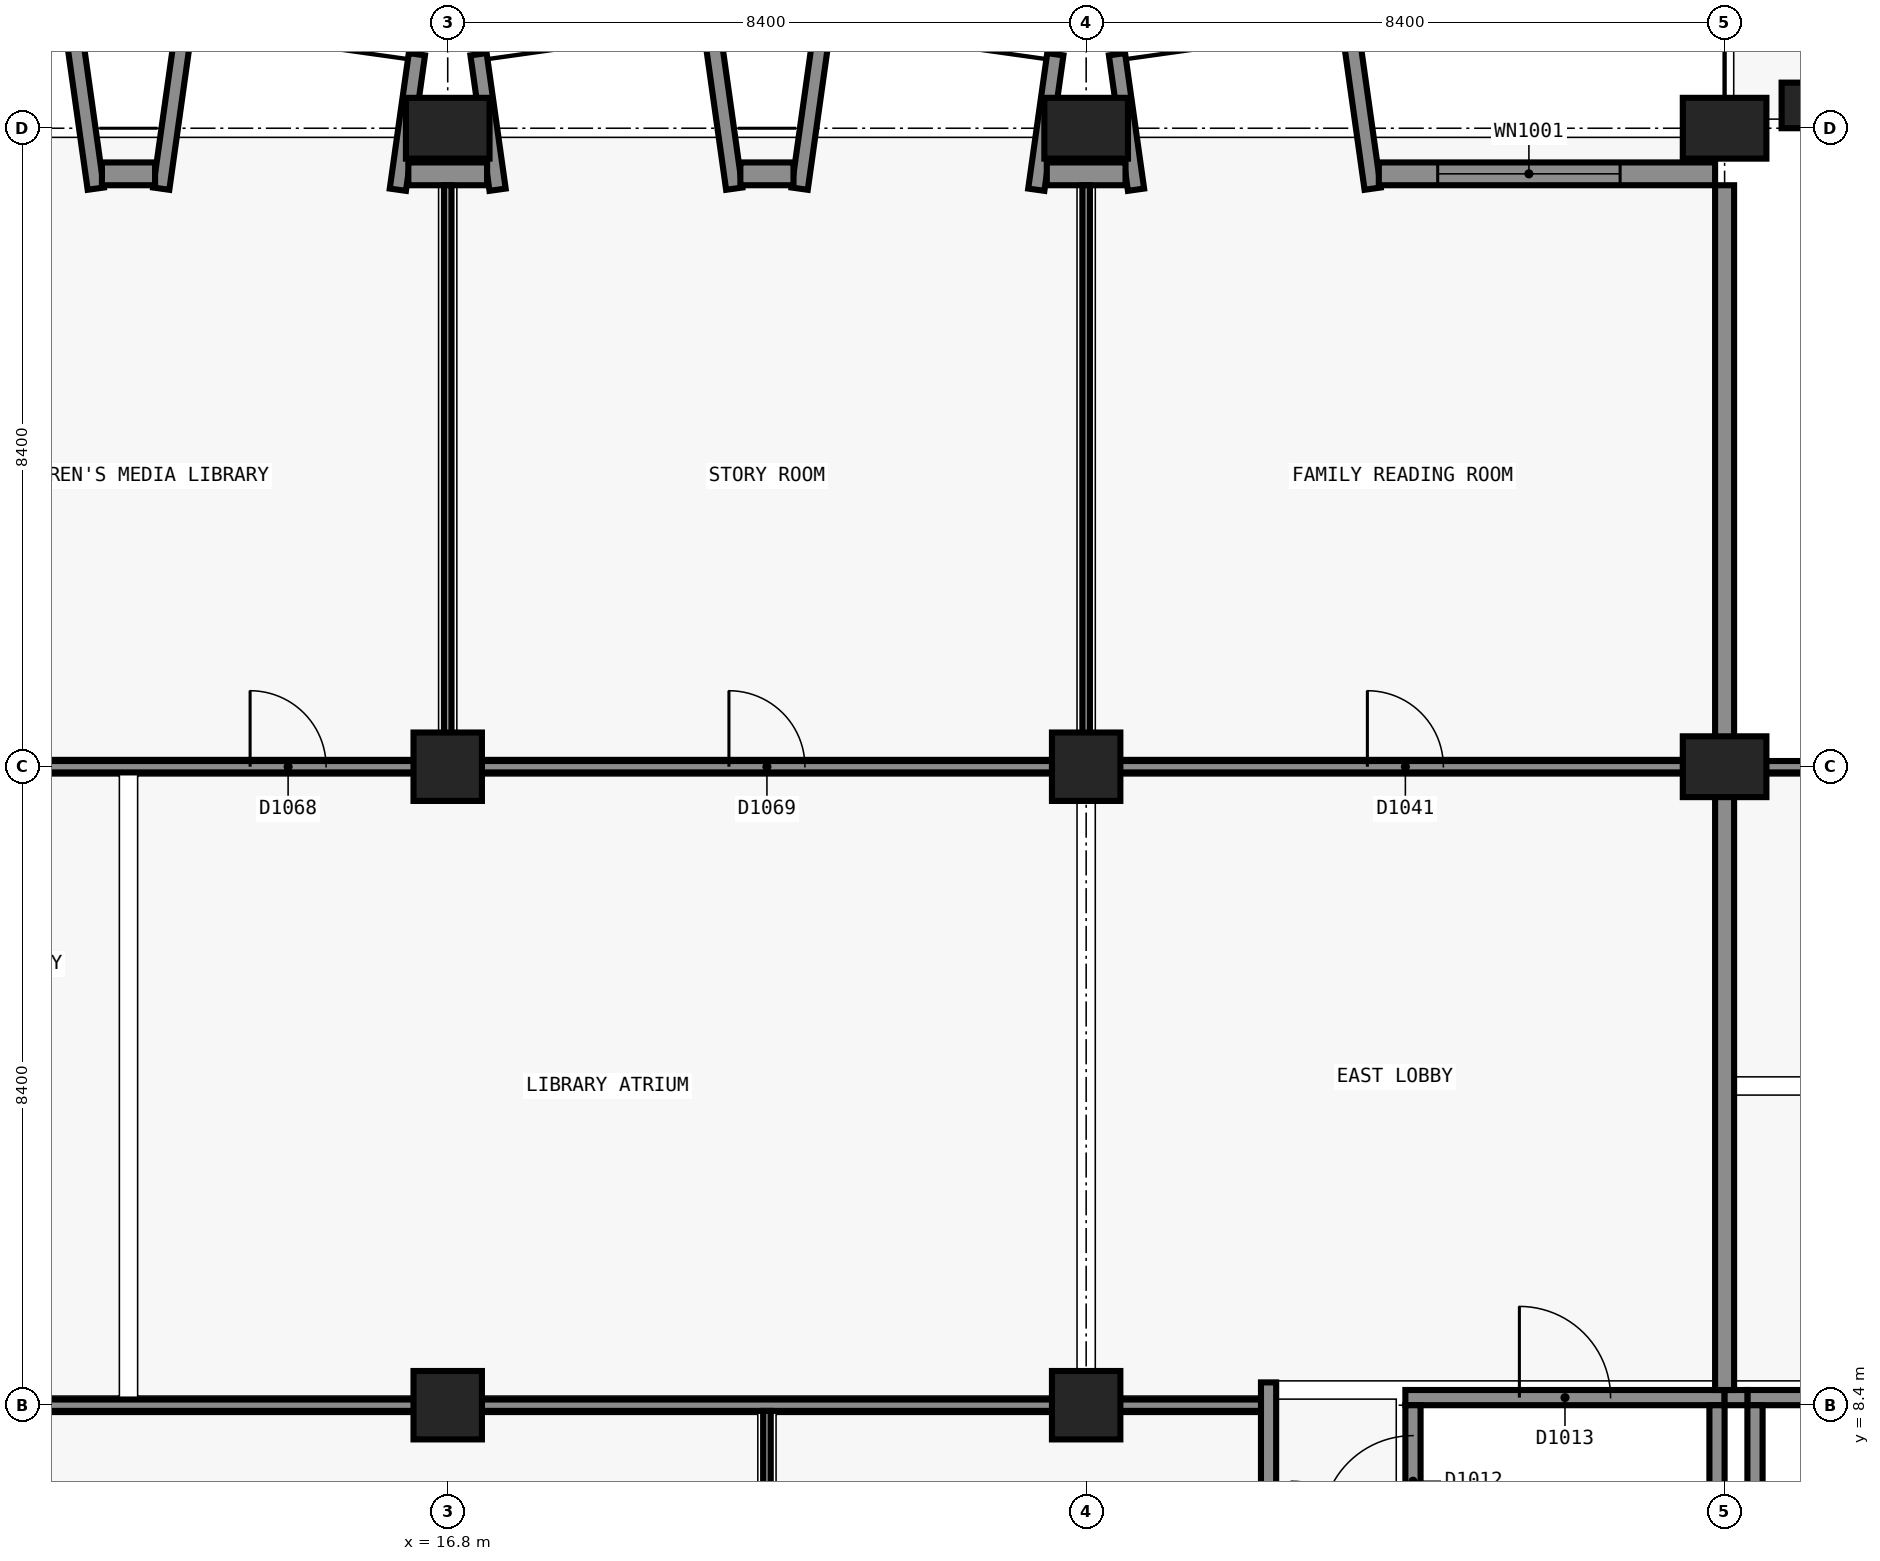
"""IFC4 building model, lengths in metres.
Left out: names, types, materials, properties, quantities, classifications, styles, units other than length and angle.
Written with IfcOpenShell. Run it as: python <this file> out.ifc"""

import sys

from ifc_helpers import new_model, si_unit, direction, frame, frame_2d, origin, origin_2d, place, context, subcontext, project, spatial, rectangle, extrude, element, fill, save


model = new_model("IFC4")
c1 = context("Model", 3, precision=1e-05, world=origin(), true_north=direction((0.0, 1.0)))
c2 = subcontext(c1, "Body", "Model", "MODEL_VIEW")
j1 = project(units=[si_unit("LENGTHUNIT", "METRE"), si_unit("PLANEANGLEUNIT", "RADIAN")], contexts=[c1])
p1 = place(None, origin())
s1 = spatial("IfcSite", under=j1, at=p1, CompositionType="ELEMENT")
p2 = place(p1, origin())
s2 = spatial("IfcBuilding", under=s1, at=p2, CompositionType="ELEMENT")
p3 = place(p2, frame((0.0, 0.0, 5.4)))
s3 = spatial("IfcBuildingStorey", under=s2, at=p3, CompositionType="ELEMENT", Elevation=5.4)
p4 = place(p3, frame((29.4, 8.5, 0.0), z_axis=(0.0, 0.0, 1.0), x_axis=(1.0, 0.0, 0.0)))
e1 = element("IfcWall", 1, at=p4, inside=s3, PredefinedType="SHEAR", context=c2, shape_type="SweptSolid", body=[
    extrude(rectangle(XDim=4.2, YDim=0.2, at=frame_2d((2.1, 0.0))), origin(), (0.0, 0.0, 1.0), 4.8),
])
p5 = place(p4, frame((1.5, 0.0, 0.0)))
e2 = element("IfcOpeningElement", 2, at=p5, cuts=e1, PredefinedType="OPENING", context=c2, shape_type="SweptSolid", body=[
    extrude(rectangle(XDim=1.2, YDim=2.1, at=frame_2d((0.6, 1.05))), frame((0.0, 0.11, 0.0), z_axis=(0.0, -1.0, 0.0), x_axis=(1.0, 0.0, 0.0)), (0.0, 0.0, 1.0), 0.22),
])
p6 = place(p3, frame((29.5, 0.2, 0.0), z_axis=(0.0, 0.0, 1.0), x_axis=(0.0, 1.0, 0.0)))
e3 = element("IfcWall", 3, at=p6, inside=s3, PredefinedType="SHEAR", context=c2, shape_type="SweptSolid", body=[
    extrude(rectangle(XDim=8.2, YDim=0.2, at=frame_2d((4.1, 0.0))), origin(), (0.0, 0.0, 1.0), 4.8),
])
p7 = place(p6, frame((6.6, 0.0, 0.0)))
e4 = element("IfcOpeningElement", 4, at=p7, cuts=e3, PredefinedType="OPENING", context=c2, shape_type="SweptSolid", body=[
    extrude(rectangle(XDim=1.2, YDim=2.1, at=frame_2d((0.6, 1.05))), frame((0.0, 0.11, 0.0), z_axis=(0.0, -1.0, 0.0), x_axis=(1.0, 0.0, 0.0)), (0.0, 0.0, 1.0), 0.22),
])
p8 = place(p3, frame((33.5, 8.4, 0.0), z_axis=(0.0, 0.0, 1.0), x_axis=(0.0, -1.0, 0.0)))
e5 = element("IfcWall", 5, at=p8, inside=s3, PredefinedType="SHEAR", context=c2, shape_type="SweptSolid", body=[
    extrude(rectangle(XDim=8.2, YDim=0.2, at=frame_2d((4.1, 0.0))), origin(), (0.0, 0.0, 1.0), 4.8),
])
p9 = place(p3, frame((33.9, 8.5, 0.0), z_axis=(0.0, 0.0, 1.0), x_axis=(1.0, 0.0, 0.0)))
e6 = element("IfcWall", 6, at=p9, inside=s3, PredefinedType="SHEAR", context=c2, shape_type="SweptSolid", body=[
    extrude(rectangle(XDim=3.9, YDim=0.2, at=frame_2d((1.95, 0.0))), origin(), (0.0, 0.0, 1.0), 4.8),
])
p10 = place(p9, frame((1.2, 0.0, 0.0)))
e7 = element("IfcOpeningElement", 7, at=p10, cuts=e6, PredefinedType="OPENING", context=c2, shape_type="SweptSolid", body=[
    extrude(rectangle(XDim=1.2, YDim=2.1, at=frame_2d((0.6, 1.05))), frame((0.0, 0.11, 0.0), z_axis=(0.0, -1.0, 0.0), x_axis=(1.0, 0.0, 0.0)), (0.0, 0.0, 1.0), 0.22),
])
p11 = place(p3, frame((34.0, 0.2, 0.0), z_axis=(0.0, 0.0, 1.0), x_axis=(0.0, 1.0, 0.0)))
e8 = element("IfcWall", 8, at=p11, inside=s3, PredefinedType="SHEAR", context=c2, shape_type="SweptSolid", body=[
    extrude(rectangle(XDim=8.2, YDim=0.2, at=frame_2d((4.1, 0.0))), origin(), (0.0, 0.0, 1.0), 4.8),
])
for number, where, z_axis, x_axis in (
    (9, (16.8, 8.4, 0.0), (0.0, 0.0, 1.0), (1.0, 0.0, 0.0)),
    (10, (16.8, 16.8, 0.0), (0.0, 0.0, 1.0), (1.0, 0.0, 0.0)),
):
    element("IfcColumn", number, at=place(p3, frame(where, z_axis=z_axis, x_axis=x_axis)), inside=s3, PredefinedType="COLUMN", context=c2, shape_type="SweptSolid", body=[
        extrude(rectangle(XDim=0.9, YDim=0.9, at=origin_2d()), origin(), (0.0, 0.0, 1.0), 4.8),
    ])
p12 = place(p3, frame((16.8, 25.2, 0.0), z_axis=(0.0, 0.0, 1.0), x_axis=(1.0, 0.0, 0.0)))
e11 = element("IfcColumn", 11, at=p12, inside=s3, PredefinedType="COLUMN", context=c2, shape_type="SweptSolid", body=[
    extrude(rectangle(XDim=1.1, YDim=0.8, at=origin_2d()), origin(), (0.0, 0.0, 1.0), 4.8),
])
for number, where, z_axis, x_axis in (
    (12, (25.2, 8.4, 0.0), (0.0, 0.0, 1.0), (1.0, 0.0, 0.0)),
    (13, (25.2, 16.8, 0.0), (0.0, 0.0, 1.0), (1.0, 0.0, 0.0)),
):
    element("IfcColumn", number, at=place(p3, frame(where, z_axis=z_axis, x_axis=x_axis)), inside=s3, PredefinedType="COLUMN", context=c2, shape_type="SweptSolid", body=[
        extrude(rectangle(XDim=0.9, YDim=0.9, at=origin_2d()), origin(), (0.0, 0.0, 1.0), 4.8),
    ])
for number, where, z_axis, x_axis in (
    (14, (25.2, 25.2, 0.0), (0.0, 0.0, 1.0), (1.0, 0.0, 0.0)),
    (15, (33.6, 16.8, 0.0), (0.0, 0.0, 1.0), (0.0, 1.0, 0.0)),
    (16, (33.6, 25.2, 0.0), (0.0, 0.0, 1.0), (1.0, 0.0, 0.0)),
):
    element("IfcColumn", number, at=place(p3, frame(where, z_axis=z_axis, x_axis=x_axis)), inside=s3, PredefinedType="COLUMN", context=c2, shape_type="SweptSolid", body=[
        extrude(rectangle(XDim=1.1, YDim=0.8, at=origin_2d()), origin(), (0.0, 0.0, 1.0), 4.8),
    ])
p13 = place(p3, frame((34.65, 25.5, 0.0), z_axis=(0.0, 0.0, 1.0), x_axis=(1.0, 0.0, 0.0)))
e17 = element("IfcColumn", 17, at=p13, inside=s3, PredefinedType="COLUMN", context=c2, shape_type="SweptSolid", body=[
    extrude(rectangle(XDim=0.6, YDim=0.6, at=origin_2d()), origin(), (0.0, 0.0, 1.0), 4.8),
])
p14 = place(p3, frame((33.6, 8.5, 0.0), z_axis=(0.0, 0.0, 1.0), x_axis=(1.0, 0.0, 0.0)))
e18 = element("IfcWall", 18, at=p14, inside=s3, PredefinedType="SHEAR", context=c2, shape_type="SweptSolid", body=[
    extrude(rectangle(XDim=0.3, YDim=0.2, at=frame_2d((0.15, 0.0))), origin(), (0.0, 0.0, 1.0), 4.8),
])
p15 = place(p3, frame((12.169, 24.405, 0.0), z_axis=(0.0, 0.0, 1.0), x_axis=(-0.139141913905, 0.990272451295, 0.0)))
e19 = element("IfcWall", 19, at=p15, inside=s3, PredefinedType="SOLIDWALL", context=c2, shape_type="SweptSolid", body=[
    extrude(rectangle(XDim=2.219, YDim=0.215, at=frame_2d((1.11, 0.0))), origin(), (0.0, 0.0, 1.0), 4.5),
])
p16 = place(p3, frame((13.031, 24.405, 0.0), z_axis=(0.0, 0.0, 1.0), x_axis=(0.139249775508, 0.99025728981, 0.0)))
e20 = element("IfcWall", 20, at=p16, inside=s3, PredefinedType="SOLIDWALL", context=c2, shape_type="SweptSolid", body=[
    extrude(rectangle(XDim=2.22, YDim=0.215, at=frame_2d((1.11, 0.0))), origin(), (0.0, 0.0, 1.0), 4.5),
])
for number, where, z_axis, x_axis in (
    (21, (16.144, 24.391, 0.0), (0.0, 0.0, 1.0), (0.139, 0.99, 0.0)),
    (22, (17.456, 24.391, 0.0), (0.0, 0.0, 1.0), (-0.139, 0.99, 0.0)),
):
    element("IfcWall", number, at=place(p3, frame(where, z_axis=z_axis, x_axis=x_axis)), inside=s3, PredefinedType="SOLIDWALL", context=c2, shape_type="SweptSolid", body=[
        extrude(rectangle(XDim=1.8, YDim=0.215, at=frame_2d((0.9, 0.0))), origin(), (0.0, 0.0, 1.0), 4.5),
    ])
for number, where, z_axis, x_axis in (
    (23, (20.569, 24.405, 0.0), (0.0, 0.0, 1.0), (-0.139, 0.99, 0.0)),
    (24, (21.431, 24.405, 0.0), (0.0, 0.0, 1.0), (0.139, 0.99, 0.0)),
):
    element("IfcWall", number, at=place(p3, frame(where, z_axis=z_axis, x_axis=x_axis)), inside=s3, PredefinedType="SOLIDWALL", context=c2, shape_type="SweptSolid", body=[
        extrude(rectangle(XDim=2.219, YDim=0.215, at=frame_2d((1.11, 0.0))), origin(), (0.0, 0.0, 1.0), 4.5),
    ])
for number, where, z_axis, x_axis in (
    (25, (24.544, 24.391, 0.0), (0.0, 0.0, 1.0), (0.139, 0.99, 0.0)),
    (26, (25.856, 24.391, 0.0), (0.0, 0.0, 1.0), (-0.139, 0.99, 0.0)),
):
    element("IfcWall", number, at=place(p3, frame(where, z_axis=z_axis, x_axis=x_axis)), inside=s3, PredefinedType="SOLIDWALL", context=c2, shape_type="SweptSolid", body=[
        extrude(rectangle(XDim=1.8, YDim=0.215, at=frame_2d((0.9, 0.0))), origin(), (0.0, 0.0, 1.0), 4.5),
    ])
p17 = place(p3, frame((28.969, 24.405, 0.0), z_axis=(0.0, 0.0, 1.0), x_axis=(-0.139249775508, 0.99025728981, 0.0)))
e27 = element("IfcWall", 27, at=p17, inside=s3, PredefinedType="SOLIDWALL", context=c2, shape_type="SweptSolid", body=[
    extrude(rectangle(XDim=2.22, YDim=0.215, at=frame_2d((1.11, 0.0))), origin(), (0.0, 0.0, 1.0), 4.5),
])
p18 = place(p3, frame((12.25, 24.6, 0.0), z_axis=(0.0, 0.0, 1.0), x_axis=(1.0, 0.0, 0.0)))
e28 = element("IfcWall", 28, at=p18, inside=s3, PredefinedType="SOLIDWALL", context=c2, shape_type="SweptSolid", body=[
    extrude(rectangle(XDim=0.699, YDim=0.3, at=frame_2d((0.35, 0.0))), origin(), (0.0, 0.0, 1.0), 4.5),
])
p19 = place(p3, frame((16.282, 24.6, 0.0), z_axis=(0.0, 0.0, 1.0), x_axis=(1.0, 0.0, 0.0)))
e29 = element("IfcWall", 29, at=p19, inside=s3, PredefinedType="SOLIDWALL", context=c2, shape_type="SweptSolid", body=[
    extrude(rectangle(XDim=1.036, YDim=0.3, at=frame_2d((0.518, 0.0))), origin(), (0.0, 0.0, 1.0), 4.5),
])
p20 = place(p3, frame((20.65, 24.6, 0.0), z_axis=(0.0, 0.0, 1.0), x_axis=(1.0, 0.0, 0.0)))
e30 = element("IfcWall", 30, at=p20, inside=s3, PredefinedType="SOLIDWALL", context=c2, shape_type="SweptSolid", body=[
    extrude(rectangle(XDim=0.699, YDim=0.3, at=frame_2d((0.35, 0.0))), origin(), (0.0, 0.0, 1.0), 4.5),
])
p21 = place(p3, frame((24.682, 24.6, 0.0), z_axis=(0.0, 0.0, 1.0), x_axis=(1.0, 0.0, 0.0)))
e31 = element("IfcWall", 31, at=p21, inside=s3, PredefinedType="SOLIDWALL", context=c2, shape_type="SweptSolid", body=[
    extrude(rectangle(XDim=1.036, YDim=0.3, at=frame_2d((0.518, 0.0))), origin(), (0.0, 0.0, 1.0), 4.5),
])
p22 = place(p3, frame((29.051, 24.6, 0.0), z_axis=(0.0, 0.0, 1.0), x_axis=(1.0, 0.0, 0.0)))
e32 = element("IfcWall", 32, at=p22, inside=s3, PredefinedType="SOLIDWALL", context=c2, shape_type="SweptSolid", body=[
    extrude(rectangle(XDim=4.425, YDim=0.3, at=frame_2d((2.212, 0.0))), origin(), (0.0, 0.0, 1.0), 4.5),
])
p23 = place(p22, frame((0.775, 0.0, 0.9)))
e33 = element("IfcOpeningElement", 33, at=p23, cuts=e32, PredefinedType="OPENING", context=c2, shape_type="SweptSolid", body=[
    extrude(rectangle(XDim=2.4, YDim=1.5, at=frame_2d((1.2, 0.75))), frame((0.0, 0.16, 0.0), z_axis=(0.0, -1.0, 0.0), x_axis=(1.0, 0.0, 0.0)), (0.0, 0.0, 1.0), 0.32),
])
p24 = place(p3, frame((33.6, 8.6, 0.0), z_axis=(0.0, 0.0, 1.0), x_axis=(0.0, 1.0, 0.0)))
e34 = element("IfcWall", 34, at=p24, inside=s3, PredefinedType="SOLIDWALL", context=c2, shape_type="SweptSolid", body=[
    extrude(rectangle(XDim=15.85, YDim=0.25, at=frame_2d((7.925, 0.0))), origin(), (0.0, 0.0, 1.0), 3.8),
])
p25 = place(p3, frame((27.6, 6.3, 0.0), z_axis=(0.0, 0.0, 1.0), x_axis=(0.0, 1.0, 0.0)))
e35 = element("IfcWall", 35, at=p25, inside=s3, PredefinedType="SOLIDWALL", context=c2, shape_type="SweptSolid", body=[
    extrude(rectangle(XDim=2.4, YDim=0.2, at=frame_2d((1.2, 0.0))), origin(), (0.0, 0.0, 1.0), 4.0),
])
p26 = place(p3, frame((8.325, 8.4, 0.0), z_axis=(0.0, 0.0, 1.0), x_axis=(1.0, 0.0, 0.0)))
e36 = element("IfcWall", 36, at=p26, inside=s3, PredefinedType="PARTITIONING", context=c2, shape_type="SweptSolid", body=[
    extrude(rectangle(XDim=19.175, YDim=0.15, at=frame_2d((9.587, 0.0))), origin(), (0.0, 0.0, 1.0), 3.8),
])
p27 = place(p3, frame((8.325, 16.8, 0.0), z_axis=(0.0, 0.0, 1.0), x_axis=(1.0, 0.0, 0.0)))
e37 = element("IfcWall", 37, at=p27, inside=s3, PredefinedType="PARTITIONING", context=c2, shape_type="SweptSolid", body=[
    extrude(rectangle(XDim=25.15, YDim=0.15, at=frame_2d((12.575, 0.0))), origin(), (0.0, 0.0, 1.0), 3.8),
])
p28 = place(p27, frame((20.575, 0.0, 0.0)))
e38 = element("IfcOpeningElement", 38, at=p28, cuts=e37, PredefinedType="OPENING", context=c2, shape_type="SweptSolid", body=[
    extrude(rectangle(XDim=1.0, YDim=2.1, at=frame_2d((0.5, 1.05))), frame((0.0, 0.085, 0.0), z_axis=(0.0, -1.0, 0.0), x_axis=(1.0, 0.0, 0.0)), (0.0, 0.0, 1.0), 0.17),
])
p29 = place(p27, frame((5.875, 0.0, 0.0)))
e39 = element("IfcOpeningElement", 39, at=p29, cuts=e37, PredefinedType="OPENING", context=c2, shape_type="SweptSolid", body=[
    extrude(rectangle(XDim=1.0, YDim=2.1, at=frame_2d((0.5, 1.05))), frame((0.0, 0.085, 0.0), z_axis=(0.0, -1.0, 0.0), x_axis=(1.0, 0.0, 0.0)), (0.0, 0.0, 1.0), 0.17),
])
p30 = place(p27, frame((12.175, 0.0, 0.0)))
e40 = element("IfcOpeningElement", 40, at=p30, cuts=e37, PredefinedType="OPENING", context=c2, shape_type="SweptSolid", body=[
    extrude(rectangle(XDim=1.0, YDim=2.1, at=frame_2d((0.5, 1.05))), frame((0.0, 0.085, 0.0), z_axis=(0.0, -1.0, 0.0), x_axis=(1.0, 0.0, 0.0)), (0.0, 0.0, 1.0), 0.17),
])
p31 = place(p3, frame((33.725, 16.8, 0.0), z_axis=(0.0, 0.0, 1.0), x_axis=(1.0, 0.0, 0.0)))
e41 = element("IfcWall", 41, at=p31, inside=s3, PredefinedType="PARTITIONING", context=c2, shape_type="SweptSolid", body=[
    extrude(rectangle(XDim=8.15, YDim=0.15, at=frame_2d((4.075, 0.0))), origin(), (0.0, 0.0, 1.0), 3.8),
])
p32 = place(p31, frame((2.675, 0.0, 0.0)))
e42 = element("IfcOpeningElement", 42, at=p32, cuts=e41, PredefinedType="OPENING", context=c2, shape_type="SweptSolid", body=[
    extrude(rectangle(XDim=1.0, YDim=2.1, at=frame_2d((0.5, 1.05))), frame((0.0, 0.085, 0.0), z_axis=(0.0, -1.0, 0.0), x_axis=(1.0, 0.0, 0.0)), (0.0, 0.0, 1.0), 0.17),
])
p33 = place(p3, frame((16.8, 16.875, 0.0), z_axis=(0.0, 0.0, 1.0), x_axis=(0.0, 1.0, 0.0)))
e43 = element("IfcWall", 43, at=p33, inside=s3, PredefinedType="PARTITIONING", context=c2, shape_type="SweptSolid", body=[
    extrude(rectangle(XDim=7.575, YDim=0.1, at=frame_2d((3.788, 0.0))), origin(), (0.0, 0.0, 1.0), 3.8),
])
p34 = place(p3, frame((21.0, 0.75, 0.0), z_axis=(0.0, 0.0, 1.0), x_axis=(0.0, 1.0, 0.0)))
e44 = element("IfcWall", 44, at=p34, inside=s3, PredefinedType="PARTITIONING", context=c2, shape_type="SweptSolid", body=[
    extrude(rectangle(XDim=7.575, YDim=0.1, at=frame_2d((3.788, 0.0))), origin(), (0.0, 0.0, 1.0), 3.8),
])
p35 = place(p34, frame((2.95, 0.0, 0.0)))
e45 = element("IfcOpeningElement", 45, at=p35, cuts=e44, PredefinedType="OPENING", context=c2, shape_type="SweptSolid", body=[
    extrude(rectangle(XDim=1.0, YDim=2.1, at=frame_2d((0.5, 1.05))), frame((0.0, 0.06, 0.0), z_axis=(0.0, -1.0, 0.0), x_axis=(1.0, 0.0, 0.0)), (0.0, 0.0, 1.0), 0.12),
])
p36 = place(p3, frame((25.2, 16.875, 0.0), z_axis=(0.0, 0.0, 1.0), x_axis=(0.0, 1.0, 0.0)))
e46 = element("IfcWall", 46, at=p36, inside=s3, PredefinedType="PARTITIONING", context=c2, shape_type="SweptSolid", body=[
    extrude(rectangle(XDim=7.575, YDim=0.1, at=frame_2d((3.788, 0.0))), origin(), (0.0, 0.0, 1.0), 3.8),
])
p37 = place(p23, origin())
e47 = element("IfcWindow", 47, at=p37, inside=s3, PartitioningType="SINGLE_PANEL", PredefinedType="WINDOW", context=c2, shape_type="SweptSolid", body=[
    extrude(rectangle(XDim=2.4, YDim=1.5, at=frame_2d((1.2, 0.75))), frame((0.0, 0.03, 0.0), z_axis=(0.0, -1.0, 0.0), x_axis=(1.0, 0.0, 0.0)), (0.0, 0.0, 1.0), 0.06),
])
fill(e33, e47)
p38 = place(p7, origin())
e48 = element("IfcDoor", 48, at=p38, inside=s3, OperationType="SINGLE_SWING_RIGHT", PredefinedType="DOOR", context=c2, shape_type="SweptSolid", body=[
    extrude(rectangle(XDim=1.2, YDim=2.1, at=frame_2d((0.6, 1.05))), frame((0.0, 0.025, 0.0), z_axis=(0.0, -1.0, 0.0), x_axis=(1.0, 0.0, 0.0)), (0.0, 0.0, 1.0), 0.05),
])
fill(e4, e48)
p39 = place(p5, origin())
e49 = element("IfcDoor", 49, at=p39, inside=s3, OperationType="SINGLE_SWING_RIGHT", PredefinedType="DOOR", context=c2, shape_type="SweptSolid", body=[
    extrude(rectangle(XDim=1.2, YDim=2.1, at=frame_2d((0.6, 1.05))), frame((0.0, 0.025, 0.0), z_axis=(0.0, -1.0, 0.0), x_axis=(1.0, 0.0, 0.0)), (0.0, 0.0, 1.0), 0.05),
])
fill(e2, e49)
p40 = place(p28, origin())
e50 = element("IfcDoor", 50, at=p40, inside=s3, OperationType="SINGLE_SWING_LEFT", PredefinedType="DOOR", context=c2, shape_type="SweptSolid", body=[
    extrude(rectangle(XDim=1.0, YDim=2.1, at=frame_2d((0.5, 1.05))), frame((0.0, 0.025, 0.0), z_axis=(0.0, -1.0, 0.0), x_axis=(1.0, 0.0, 0.0)), (0.0, 0.0, 1.0), 0.05),
])
fill(e38, e50)
p41 = place(p29, origin())
e51 = element("IfcDoor", 51, at=p41, inside=s3, OperationType="SINGLE_SWING_LEFT", PredefinedType="DOOR", context=c2, shape_type="SweptSolid", body=[
    extrude(rectangle(XDim=1.0, YDim=2.1, at=frame_2d((0.5, 1.05))), frame((0.0, 0.025, 0.0), z_axis=(0.0, -1.0, 0.0), x_axis=(1.0, 0.0, 0.0)), (0.0, 0.0, 1.0), 0.05),
])
fill(e39, e51)
p42 = place(p30, origin())
e52 = element("IfcDoor", 52, at=p42, inside=s3, OperationType="SINGLE_SWING_RIGHT", PredefinedType="DOOR", context=c2, shape_type="SweptSolid", body=[
    extrude(rectangle(XDim=1.0, YDim=2.1, at=frame_2d((0.5, 1.05))), frame((0.0, 0.025, 0.0), z_axis=(0.0, -1.0, 0.0), x_axis=(1.0, 0.0, 0.0)), (0.0, 0.0, 1.0), 0.05),
])
fill(e40, e52)
save(model, sys.argv[1])
